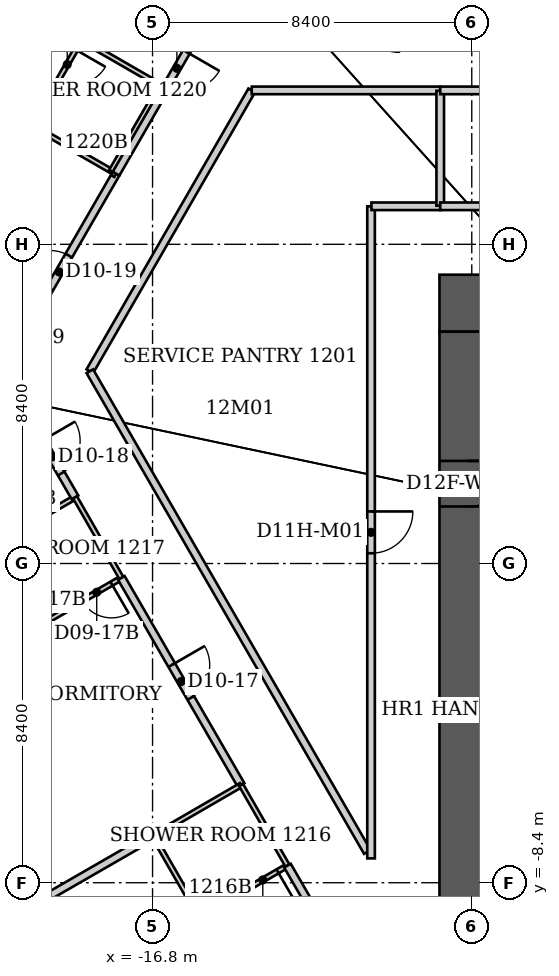
"""IFC4 building model, lengths in metres.
Left out: names, types, materials, properties, quantities, classifications, styles, units other than length and angle.
Written with IfcOpenShell. Run it as: python <this file> out.ifc"""

import sys

from ifc_helpers import new_model, si_unit, direction, frame, frame_2d, origin, origin_2d, place, context, subcontext, project, spatial, rectangle, extrude, clip, halfspace, element, fill, save


model = new_model("IFC4")
c1 = context("Model", 3, precision=1e-05, world=origin(), true_north=direction((0.0, 1.0)))
c2 = subcontext(c1, "Body", "Model", "MODEL_VIEW")
j1 = project(units=[si_unit("LENGTHUNIT", "METRE"), si_unit("PLANEANGLEUNIT", "RADIAN")], contexts=[c1])
p1 = place(None, origin())
s1 = spatial("IfcSite", under=j1, at=p1, CompositionType="ELEMENT")
p2 = place(p1, origin())
s2 = spatial("IfcBuilding", under=s1, at=p2, CompositionType="ELEMENT")
p3 = place(p2, frame((0.0, 0.0, 53.4)))
s3 = spatial("IfcBuildingStorey", under=s2, at=p3, CompositionType="ELEMENT", Elevation=53.4)
p4 = place(p3, frame((-20.701, -9.521, 0.0), z_axis=(0.0, 0.0, 1.0), x_axis=(-0.866025403784, -0.5, 0.0)))
e1 = element("IfcColumn", 1, at=p4, inside=s3, PredefinedType="COLUMN", context=c2, shape_type="SweptSolid", body=[
    clip(extrude(rectangle(XDim=2.4, YDim=2.4, at=origin_2d()), origin(), (0.0, 0.0, 1.0), 3.752), halfspace(frame((0.0, 0.0, 3.64)), False)),
])
p5 = place(p3, frame((-9.25, 6.85, 0.0), z_axis=(0.0, 0.0, 1.0), x_axis=(1.0, 0.0, 0.0)))
e2 = element("IfcWall", 2, at=p5, inside=s3, PredefinedType="SHEAR", context=c2, shape_type="SweptSolid", body=[
    extrude(rectangle(XDim=18.5, YDim=1.5, at=frame_2d((9.25, 0.0))), origin(), (0.0, 0.0, 1.0), 3.8),
])
p6 = place(p3, frame((-8.5, -9.2, 0.0), z_axis=(0.0, 0.0, 1.0), x_axis=(0.0, 1.0, 0.0)))
e3 = element("IfcWall", 3, at=p6, inside=s3, PredefinedType="SHEAR", context=c2, shape_type="SweptSolid", body=[
    extrude(rectangle(XDim=15.3, YDim=1.5, at=frame_2d((7.65, 0.0))), origin(), (0.0, 0.0, 1.0), 3.8),
])
p7 = place(p6, frame((10.7, 0.0, 0.0)))
e4 = element("IfcOpeningElement", 4, at=p7, cuts=e3, PredefinedType="OPENING", context=c2, shape_type="SweptSolid", body=[
    extrude(rectangle(XDim=1.2, YDim=2.2, at=frame_2d((0.6, 1.1))), frame((0.0, 0.75, 0.0), z_axis=(0.0, -1.0, 0.0), x_axis=(1.0, 0.0, 0.0)), (0.0, 0.0, 1.0), 1.5),
])
p8 = place(p3, frame((-21.726, -10.02, 0.0), z_axis=(0.0, 0.0, 1.0), x_axis=(0.866442508333, 0.499276856818, 0.0)))
e5 = element("IfcWall", 5, at=p8, inside=s3, PredefinedType="PARTITIONING", context=c2, shape_type="SweptSolid", body=[
    extrude(rectangle(XDim=5.708, YDim=0.2, at=frame_2d((2.854, 0.0))), origin(), (0.0, 0.0, 1.0), 3.023),
])
p9 = place(p3, frame((-20.748, 5.082, 0.0), z_axis=(0.0, 0.0, 1.0), x_axis=(0.499925128535, 0.86606862653, 0.0)))
e6 = element("IfcWall", 6, at=p9, inside=s3, PredefinedType="PARTITIONING", context=c2, shape_type="SweptSolid", body=[
    extrude(rectangle(XDim=5.979, YDim=0.2, at=frame_2d((2.989, 0.0))), origin(), (0.0, 0.0, 1.0), 3.64),
])
p10 = place(p9, frame((2.489, 0.0, 0.0)))
e7 = element("IfcOpeningElement", 7, at=p10, cuts=e6, PredefinedType="OPENING", context=c2, shape_type="SweptSolid", body=[
    extrude(rectangle(XDim=1.0, YDim=2.13, at=frame_2d((0.5, 1.065))), frame((0.0, 0.1, 0.0), z_axis=(0.0, -1.0, 0.0), x_axis=(1.0, 0.0, 0.0)), (0.0, 0.0, 1.0), 0.2),
])
p11 = place(p3, frame((-20.489, 0.788, 0.0), z_axis=(0.0, 0.0, 1.0), x_axis=(0.865905802456, 0.500207098383, 0.0)))
e8 = element("IfcWall", 8, at=p11, inside=s3, PredefinedType="PARTITIONING", context=c2, shape_type="SweptSolid", body=[
    extrude(rectangle(XDim=1.904, YDim=0.12, at=frame_2d((0.952, 0.0))), origin(), (0.0, 0.0, 1.0), 3.64),
])
p12 = place(p3, frame((-20.07, 3.86, 0.0), z_axis=(0.0, 0.0, 1.0), x_axis=(0.501738959866, -0.865019084271, 0.0)))
e9 = element("IfcWall", 9, at=p12, inside=s3, PredefinedType="PARTITIONING", context=c2, shape_type="SweptSolid", body=[
    extrude(rectangle(XDim=2.451, YDim=0.2, at=frame_2d((1.226, 0.0))), origin(), (0.0, 0.0, 1.0), 3.64),
])
p13 = place(p12, frame((0.726, 0.0, 0.0)))
e10 = element("IfcOpeningElement", 10, at=p13, cuts=e9, PredefinedType="OPENING", context=c2, shape_type="SweptSolid", body=[
    extrude(rectangle(XDim=1.0, YDim=2.13, at=frame_2d((0.5, 1.065))), frame((0.0, 0.1, 0.0), z_axis=(0.0, -1.0, 0.0), x_axis=(1.0, 0.0, 0.0)), (0.0, 0.0, 1.0), 0.2),
])
p14 = place(p3, frame((-19.97, 11.53, 0.0), z_axis=(0.0, 0.0, 1.0), x_axis=(0.866177122335, -0.499737123639, 0.0)))
e11 = element("IfcWall", 11, at=p14, inside=s3, PredefinedType="PARTITIONING", context=c2, shape_type="SweptSolid", body=[
    extrude(rectangle(XDim=2.401, YDim=0.12, at=frame_2d((1.201, 0.0))), origin(), (0.0, 0.0, 1.0), 2.86),
])
p15 = place(p3, frame((-19.93, -1.72, 0.0), z_axis=(0.0, 0.0, 1.0), x_axis=(0.865006586495, 0.501760505939, 0.0)))
e12 = element("IfcWall", 12, at=p15, inside=s3, PredefinedType="PARTITIONING", context=c2, shape_type="SweptSolid", body=[
    extrude(rectangle(XDim=2.67, YDim=0.12, at=frame_2d((1.335, 0.0))), origin(), (0.0, 0.0, 1.0), 2.878),
])
p16 = place(p15, frame((1.47, 0.0, 0.0)))
e13 = element("IfcOpeningElement", 13, at=p16, cuts=e12, PredefinedType="OPENING", context=c2, shape_type="SweptSolid", body=[
    extrude(rectangle(XDim=0.9, YDim=2.03, at=frame_2d((0.45, 1.015))), frame((0.0, 0.06, 0.0), z_axis=(0.0, -1.0, 0.0), x_axis=(1.0, 0.0, 0.0)), (0.0, 0.0, 1.0), 0.12),
])
p17 = place(p3, frame((-18.84, 1.74, 0.0), z_axis=(0.0, 0.0, 1.0), x_axis=(0.498555508765, -0.866857776501, 0.0)))
e14 = element("IfcWall", 14, at=p17, inside=s3, PredefinedType="PARTITIONING", context=c2, shape_type="SweptSolid", body=[
    extrude(rectangle(XDim=2.446, YDim=0.12, at=frame_2d((1.223, 0.0))), origin(), (0.0, 0.0, 1.0), 3.64),
])
p18 = place(p3, frame((-18.67, 13.78, 0.0), z_axis=(0.0, 0.0, 1.0), x_axis=(-0.500291685314, -0.865856933682, 0.0)))
e15 = element("IfcWall", 15, at=p18, inside=s3, PredefinedType="PARTITIONING", context=c2, shape_type="SweptSolid", body=[
    extrude(rectangle(XDim=2.599, YDim=0.12, at=frame_2d((1.299, 0.0))), origin(), (0.0, 0.0, 1.0), 3.64),
])
p19 = place(p18, frame((0.3, 0.0, 0.0)))
e16 = element("IfcOpeningElement", 16, at=p19, cuts=e15, PredefinedType="OPENING", context=c2, shape_type="SweptSolid", body=[
    extrude(rectangle(XDim=0.9, YDim=2.03, at=frame_2d((0.45, 1.015))), frame((0.0, 0.06, 0.0), z_axis=(0.0, -1.0, 0.0), x_axis=(1.0, 0.0, 0.0)), (0.0, 0.0, 1.0), 0.12),
])
p20 = place(p3, frame((-18.45, 5.06, 0.0), z_axis=(0.0, 0.0, 1.0), x_axis=(0.499424260127, 0.866357552282, 0.0)))
e17 = element("IfcWall", 17, at=p20, inside=s3, PredefinedType="PARTITIONING", context=c2, shape_type="SweptSolid", body=[
    extrude(rectangle(XDim=8.53, YDim=0.2, at=frame_2d((4.265, 0.0))), origin(), (0.0, 0.0, 1.0), 3.64),
])
p21 = place(p3, frame((-17.89, 10.33, 0.0), z_axis=(0.0, 0.0, 1.0), x_axis=(0.500221244143, 0.865897630733, 0.0)))
e18 = element("IfcWall", 18, at=p21, inside=s3, PredefinedType="PARTITIONING", context=c2, shape_type="SweptSolid", body=[
    extrude(rectangle(XDim=2.598, YDim=0.12, at=frame_2d((1.299, 0.0))), origin(), (0.0, 0.0, 1.0), 3.64),
])
p22 = place(p3, frame((-17.837, 10.302, 0.0), z_axis=(0.0, 0.0, 1.0), x_axis=(0.880650010303, -0.473767410606, 0.0)))
e19 = element("IfcWall", 19, at=p22, inside=s3, PredefinedType="PARTITIONING", context=c2, shape_type="SweptSolid", body=[
    extrude(rectangle(XDim=0.088, YDim=0.2, at=frame_2d((0.044, 0.0))), origin(), (0.0, 0.0, 1.0), 3.64),
])
p23 = place(p3, frame((-17.759, 10.259, 0.0), z_axis=(0.0, 0.0, 1.0), x_axis=(0.499878240725, 0.866095690123, 0.0)))
e20 = element("IfcWall", 20, at=p23, inside=s3, PredefinedType="PARTITIONING", context=c2, shape_type="SweptSolid", body=[
    extrude(rectangle(XDim=4.839, YDim=0.2, at=frame_2d((2.419, 0.0))), origin(), (0.0, 0.0, 1.0), 3.64),
])
p24 = place(p23, frame((2.7, 0.0, 0.0)))
e21 = element("IfcOpeningElement", 21, at=p24, cuts=e20, PredefinedType="OPENING", context=c2, shape_type="SweptSolid", body=[
    extrude(rectangle(XDim=1.0, YDim=2.13, at=frame_2d((0.5, 1.065))), frame((0.0, 0.1, 0.0), z_axis=(0.0, -1.0, 0.0), x_axis=(1.0, 0.0, 0.0)), (0.0, 0.0, 1.0), 0.2),
])
p25 = place(p3, frame((-17.621, -0.38, 0.0), z_axis=(0.0, 0.0, 1.0), x_axis=(0.500505674396, -0.865733255627, 0.0)))
e22 = element("IfcWall", 22, at=p25, inside=s3, PredefinedType="PARTITIONING", context=c2, shape_type="SweptSolid", body=[
    extrude(rectangle(XDim=6.295, YDim=0.2, at=frame_2d((3.147, 0.0))), origin(), (0.0, 0.0, 1.0), 3.64),
])
p26 = place(p25, frame((2.647, 0.0, 0.0)))
e23 = element("IfcOpeningElement", 23, at=p26, cuts=e22, PredefinedType="OPENING", context=c2, shape_type="SweptSolid", body=[
    extrude(rectangle(XDim=1.0, YDim=2.13, at=frame_2d((0.5, 1.065))), frame((0.0, 0.1, 0.0), z_axis=(0.0, -1.0, 0.0), x_axis=(1.0, 0.0, 0.0)), (0.0, 0.0, 1.0), 0.2),
])
p27 = place(p3, frame((-16.78, -7.17, 0.0), z_axis=(0.0, 0.0, 1.0), x_axis=(0.498748634132, -0.866746675766, 0.0)))
e24 = element("IfcWall", 24, at=p27, inside=s3, PredefinedType="PARTITIONING", context=c2, shape_type="SweptSolid", body=[
    extrude(rectangle(XDim=2.446, YDim=0.12, at=frame_2d((1.223, 0.0))), origin(), (0.0, 0.0, 1.0), 3.64),
])
p28 = place(p3, frame((-16.78, -7.17, 0.0), z_axis=(0.0, 0.0, 1.0), x_axis=(0.865029602175, 0.501720826119, 0.0)))
e25 = element("IfcWall", 25, at=p28, inside=s3, PredefinedType="PARTITIONING", context=c2, shape_type="SweptSolid", body=[
    extrude(rectangle(XDim=2.67, YDim=0.12, at=frame_2d((1.335, 0.0))), origin(), (0.0, 0.0, 1.0), 3.023),
])
p29 = place(p3, frame((-16.59, 12.58, 0.0), z_axis=(0.0, 0.0, 1.0), x_axis=(-0.866177122335, 0.499737123639, 0.0)))
e26 = element("IfcWall", 26, at=p29, inside=s3, PredefinedType="PARTITIONING", context=c2, shape_type="SweptSolid", body=[
    extrude(rectangle(XDim=2.401, YDim=0.12, at=frame_2d((1.201, 0.0))), origin(), (0.0, 0.0, 1.0), 3.64),
])
p30 = place(p3, frame((-15.56, -9.29, 0.0), z_axis=(0.0, 0.0, 1.0), x_axis=(0.86498992408, 0.501789229896, 0.0)))
e27 = element("IfcWall", 27, at=p30, inside=s3, PredefinedType="PARTITIONING", context=c2, shape_type="SweptSolid", body=[
    extrude(rectangle(XDim=2.671, YDim=0.12, at=frame_2d((1.335, 0.0))), origin(), (0.0, 0.0, 1.0), 3.64),
])
p31 = place(p30, frame((1.47, 0.0, 0.0)))
e28 = element("IfcOpeningElement", 28, at=p31, cuts=e27, PredefinedType="OPENING", context=c2, shape_type="SweptSolid", body=[
    extrude(rectangle(XDim=0.9, YDim=2.03, at=frame_2d((0.45, 1.015))), frame((0.0, 0.06, 0.0), z_axis=(0.0, -1.0, 0.0), x_axis=(1.0, 0.0, 0.0)), (0.0, 0.0, 1.0), 0.12),
])
p32 = place(p3, frame((-14.47, -5.83, 0.0), z_axis=(0.0, 0.0, 1.0), x_axis=(0.498673646582, -0.86678982124, 0.0)))
e29 = element("IfcWall", 29, at=p32, inside=s3, PredefinedType="PARTITIONING", context=c2, shape_type="SweptSolid", body=[
    extrude(rectangle(XDim=2.446, YDim=0.12, at=frame_2d((1.223, 0.0))), origin(), (0.0, 0.0, 1.0), 3.64),
])
p33 = place(p3, frame((-14.19, 12.45, 0.0), z_axis=(0.0, 0.0, 1.0), x_axis=(1.0, 0.0, 0.0)))
e30 = element("IfcWall", 30, at=p33, inside=s3, PredefinedType="PARTITIONING", context=c2, shape_type="SweptSolid", body=[
    extrude(rectangle(XDim=4.96, YDim=0.2, at=frame_2d((2.48, 0.0))), origin(), (0.0, 0.0, 1.0), 3.64),
])
p34 = place(p3, frame((-13.25, -7.95, 0.0), z_axis=(0.0, 0.0, 1.0), x_axis=(0.500447534468, -0.865766865412, 0.0)))
e31 = element("IfcWall", 31, at=p34, inside=s3, PredefinedType="PARTITIONING", context=c2, shape_type="SweptSolid", body=[
    extrude(rectangle(XDim=6.295, YDim=0.2, at=frame_2d((3.147, 0.0))), origin(), (0.0, 0.0, 1.0), 3.64),
])
p35 = place(p34, frame((2.647, 0.0, 0.0)))
e32 = element("IfcOpeningElement", 32, at=p35, cuts=e31, PredefinedType="OPENING", context=c2, shape_type="SweptSolid", body=[
    extrude(rectangle(XDim=1.0, YDim=2.13, at=frame_2d((0.5, 1.065))), frame((0.0, 0.1, 0.0), z_axis=(0.0, -1.0, 0.0), x_axis=(1.0, 0.0, 0.0)), (0.0, 0.0, 1.0), 0.2),
])
p36 = place(p3, frame((-11.147, -7.591, 0.0), z_axis=(0.0, 0.0, 1.0), x_axis=(-0.499915842114, 0.866073986911, 0.0)))
e33 = element("IfcWall", 33, at=p36, inside=s3, PredefinedType="PARTITIONING", context=c2, shape_type="SweptSolid", body=[
    extrude(rectangle(XDim=14.607, YDim=0.2, at=frame_2d((7.304, 0.0))), origin(), (0.0, 0.0, 1.0), 3.64),
])
p37 = place(p3, frame((-11.05, 9.4, 0.0), z_axis=(0.0, 0.0, 1.0), x_axis=(0.0, -1.0, 0.0)))
e34 = element("IfcWall", 34, at=p37, inside=s3, PredefinedType="PARTITIONING", context=c2, shape_type="SweptSolid", body=[
    extrude(rectangle(XDim=17.16, YDim=0.2, at=frame_2d((8.58, 0.0))), origin(), (0.0, 0.0, 1.0), 3.64),
])
p38 = place(p37, frame((8.03, 0.0, 0.0)))
e35 = element("IfcOpeningElement", 35, at=p38, cuts=e34, PredefinedType="OPENING", context=c2, shape_type="SweptSolid", body=[
    extrude(rectangle(XDim=1.1, YDim=2.2, at=frame_2d((0.55, 1.1))), frame((0.0, 0.1, 0.0), z_axis=(0.0, -1.0, 0.0), x_axis=(1.0, 0.0, 0.0)), (0.0, 0.0, 1.0), 0.2),
])
p39 = place(p3, frame((-9.23, 9.4, 0.0), z_axis=(0.0, 0.0, 1.0), x_axis=(-1.0, 0.0, 0.0)))
e36 = element("IfcWall", 36, at=p39, inside=s3, PredefinedType="PARTITIONING", context=c2, shape_type="SweptSolid", body=[
    extrude(rectangle(XDim=1.81, YDim=0.2, at=frame_2d((0.905, 0.0))), origin(), (0.0, 0.0, 1.0), 3.64),
])
p40 = place(p3, frame((-9.23, 12.44, 0.0), z_axis=(0.0, 0.0, 1.0), x_axis=(0.0, -1.0, 0.0)))
e37 = element("IfcWall", 37, at=p40, inside=s3, PredefinedType="PARTITIONING", context=c2, shape_type="SweptSolid", body=[
    extrude(rectangle(XDim=3.025, YDim=0.2, at=frame_2d((1.512, 0.0))), origin(), (0.0, 0.0, 1.0), 3.64),
])
p41 = place(p3, frame((-9.23, 12.45, 0.0), z_axis=(0.0, 0.0, 1.0), x_axis=(1.0, 0.0, 0.0)))
e38 = element("IfcWall", 38, at=p41, inside=s3, PredefinedType="PARTITIONING", context=c2, shape_type="SweptSolid", body=[
    extrude(rectangle(XDim=9.23, YDim=0.2, at=frame_2d((4.615, 0.0))), origin(), (0.0, 0.0, 1.0), 3.64),
])
p42 = place(p41, frame((4.065, 0.0, 0.0)))
e39 = element("IfcOpeningElement", 39, at=p42, cuts=e38, PredefinedType="OPENING", context=c2, shape_type="SweptSolid", body=[
    extrude(rectangle(XDim=1.1, YDim=2.2, at=frame_2d((0.55, 1.1))), frame((0.0, 0.1, 0.0), z_axis=(0.0, -1.0, 0.0), x_axis=(1.0, 0.0, 0.0)), (0.0, 0.0, 1.0), 0.2),
])
p43 = place(p3, frame((0.0, 9.4, 0.0), z_axis=(0.0, 0.0, 1.0), x_axis=(-1.0, 0.0, 0.0)))
e40 = element("IfcWall", 40, at=p43, inside=s3, PredefinedType="PARTITIONING", context=c2, shape_type="SweptSolid", body=[
    extrude(rectangle(XDim=9.23, YDim=0.2, at=frame_2d((4.615, 0.0))), origin(), (0.0, 0.0, 1.0), 3.64),
])
p44 = place(p31, origin())
e41 = element("IfcDoor", 41, at=p44, inside=s3, OperationType="SINGLE_SWING_RIGHT", PredefinedType="DOOR", context=c2, shape_type="SweptSolid", body=[
    extrude(rectangle(XDim=0.9, YDim=2.03, at=frame_2d((0.45, 1.015))), frame((0.0, 0.025, 0.0), z_axis=(0.0, -1.0, 0.0), x_axis=(1.0, 0.0, 0.0)), (0.0, 0.0, 1.0), 0.05),
])
fill(e28, e41)
p45 = place(p26, origin())
e42 = element("IfcDoor", 42, at=p45, inside=s3, OperationType="SINGLE_SWING_LEFT", PredefinedType="DOOR", context=c2, shape_type="SweptSolid", body=[
    extrude(rectangle(XDim=1.0, YDim=2.13, at=frame_2d((0.5, 1.065))), frame((0.0, 0.025, 0.0), z_axis=(0.0, -1.0, 0.0), x_axis=(1.0, 0.0, 0.0)), (0.0, 0.0, 1.0), 0.05),
])
fill(e23, e42)
p46 = place(p16, origin())
e43 = element("IfcDoor", 43, at=p46, inside=s3, OperationType="SINGLE_SWING_RIGHT", PredefinedType="DOOR", context=c2, shape_type="SweptSolid", body=[
    extrude(rectangle(XDim=0.9, YDim=2.03, at=frame_2d((0.45, 1.015))), frame((0.0, 0.025, 0.0), z_axis=(0.0, -1.0, 0.0), x_axis=(1.0, 0.0, 0.0)), (0.0, 0.0, 1.0), 0.05),
])
fill(e13, e43)
p47 = place(p13, origin())
e44 = element("IfcDoor", 44, at=p47, inside=s3, OperationType="SINGLE_SWING_LEFT", PredefinedType="DOOR", context=c2, shape_type="SweptSolid", body=[
    extrude(rectangle(XDim=1.0, YDim=2.13, at=frame_2d((0.5, 1.065))), frame((0.0, 0.025, 0.0), z_axis=(0.0, -1.0, 0.0), x_axis=(1.0, 0.0, 0.0)), (0.0, 0.0, 1.0), 0.05),
])
fill(e10, e44)
p48 = place(p10, origin())
e45 = element("IfcDoor", 45, at=p48, inside=s3, OperationType="SINGLE_SWING_LEFT", PredefinedType="DOOR", context=c2, shape_type="SweptSolid", body=[
    extrude(rectangle(XDim=1.0, YDim=2.13, at=frame_2d((0.5, 1.065))), frame((0.0, 0.025, 0.0), z_axis=(0.0, -1.0, 0.0), x_axis=(1.0, 0.0, 0.0)), (0.0, 0.0, 1.0), 0.05),
])
fill(e7, e45)
p49 = place(p24, origin())
e46 = element("IfcDoor", 46, at=p49, inside=s3, OperationType="SINGLE_SWING_RIGHT", PredefinedType="DOOR", context=c2, shape_type="SweptSolid", body=[
    extrude(rectangle(XDim=1.0, YDim=2.13, at=frame_2d((0.5, 1.065))), frame((0.0, 0.025, 0.0), z_axis=(0.0, -1.0, 0.0), x_axis=(1.0, 0.0, 0.0)), (0.0, 0.0, 1.0), 0.05),
])
fill(e21, e46)
p50 = place(p19, origin())
e47 = element("IfcDoor", 47, at=p50, inside=s3, OperationType="SINGLE_SWING_LEFT", PredefinedType="DOOR", context=c2, shape_type="SweptSolid", body=[
    extrude(rectangle(XDim=0.9, YDim=2.03, at=frame_2d((0.45, 1.015))), frame((0.0, 0.025, 0.0), z_axis=(0.0, -1.0, 0.0), x_axis=(1.0, 0.0, 0.0)), (0.0, 0.0, 1.0), 0.05),
])
fill(e16, e47)
p51 = place(p38, origin())
e48 = element("IfcDoor", 48, at=p51, inside=s3, OperationType="SINGLE_SWING_LEFT", PredefinedType="DOOR", context=c2, shape_type="SweptSolid", body=[
    extrude(rectangle(XDim=1.1, YDim=2.2, at=frame_2d((0.55, 1.1))), frame((0.0, 0.025, 0.0), z_axis=(0.0, -1.0, 0.0), x_axis=(1.0, 0.0, 0.0)), (0.0, 0.0, 1.0), 0.05),
])
fill(e35, e48)
p52 = place(p7, origin())
e49 = element("IfcDoor", 49, at=p52, inside=s3, OperationType="SINGLE_SWING_RIGHT", PredefinedType="DOOR", context=c2, shape_type="SweptSolid", body=[
    extrude(rectangle(XDim=1.2, YDim=2.2, at=frame_2d((0.6, 1.1))), frame((0.0, 0.025, 0.0), z_axis=(0.0, -1.0, 0.0), x_axis=(1.0, 0.0, 0.0)), (0.0, 0.0, 1.0), 0.05),
])
fill(e4, e49)
save(model, sys.argv[1])
